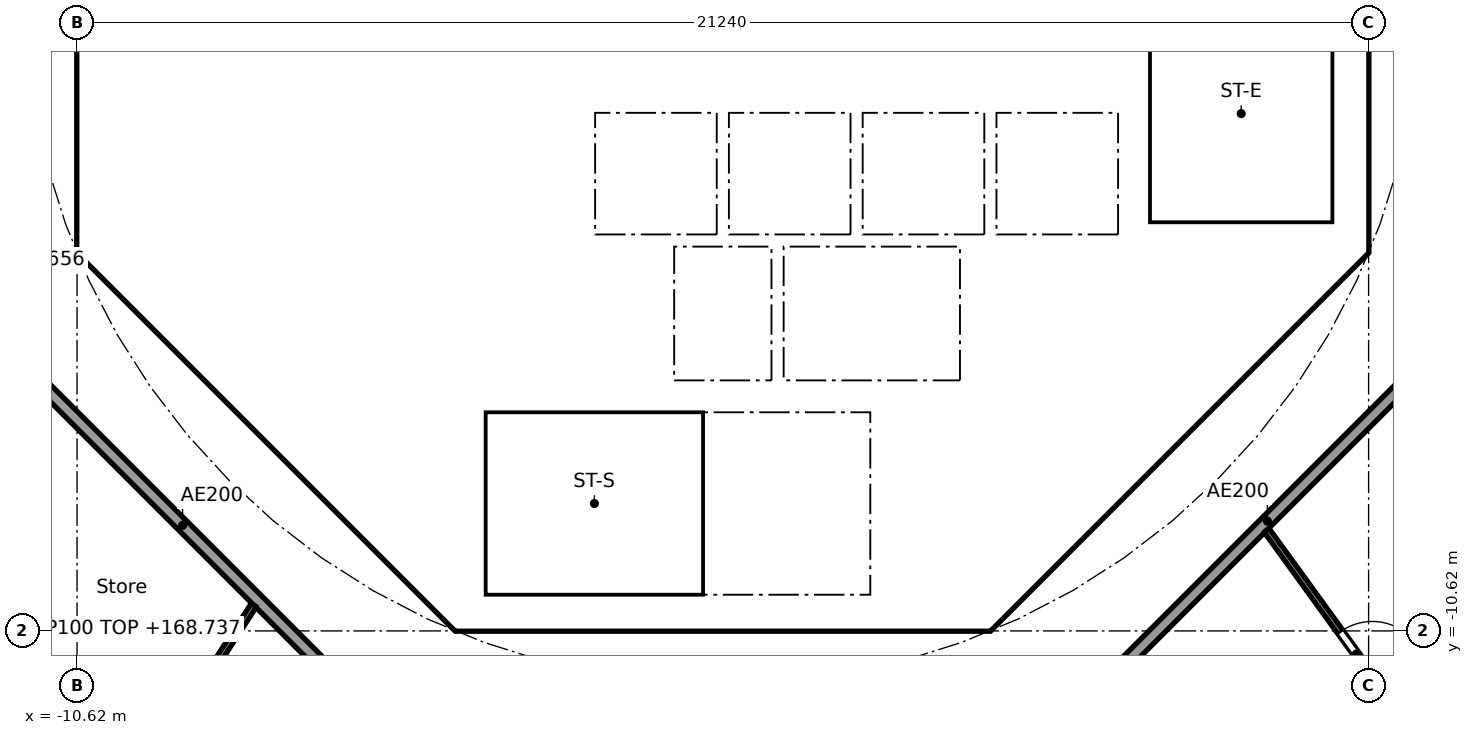
"""IFC4 building model, lengths in metres.
Left out: names, types, materials, properties, quantities, classifications, styles, units other than length and angle.
Written with IfcOpenShell. Run it as: python <this file> out.ifc"""

import sys

from ifc_helpers import new_model, si_unit, direction, frame, frame_2d, origin, place, context, subcontext, project, spatial, polyline, rectangle, outline, extrude, element, fill, save


model = new_model("IFC4")
c1 = context("Model", 3, precision=1e-05, world=origin(), true_north=direction((0.0, 1.0)))
c2 = subcontext(c1, "Body", "Model", "MODEL_VIEW")
j1 = project(units=[si_unit("LENGTHUNIT", "METRE"), si_unit("PLANEANGLEUNIT", "RADIAN")], contexts=[c1])
p1 = place(None, origin())
s1 = spatial("IfcSite", under=j1, at=p1, CompositionType="ELEMENT")
p2 = place(p1, origin())
s2 = spatial("IfcBuilding", under=s1, at=p2, CompositionType="ELEMENT")
p3 = place(p2, frame((0.0, 0.0, 165.9)))
s3 = spatial("IfcBuildingStorey", under=s2, at=p3, CompositionType="ELEMENT", Elevation=165.9)
p4 = place(p3, frame((-10.325, 3.801, 0.0), z_axis=(0.0, 0.0, 1.0), x_axis=(0.0, -1.0, 0.0)))
e1 = element("IfcWall", 1, at=p4, inside=s3, PredefinedType="SHEAR", context=c2, shape_type="SweptSolid", body=[
    extrude(rectangle(XDim=7.602, YDim=0.6, at=frame_2d((3.801, 0.0))), origin(), (0.0, 0.0, 1.0), 3.44),
])
p5 = place(p4, frame((0.651, 0.0, 0.0)))
e2 = element("IfcOpeningElement", 2, at=p5, cuts=e1, PredefinedType="OPENING", context=c2, shape_type="SweptSolid", body=[
    extrude(rectangle(XDim=1.5, YDim=2.1, at=frame_2d((0.75, 1.05))), frame((0.0, 0.31, 0.0), z_axis=(0.0, -1.0, 0.0), x_axis=(1.0, 0.0, 0.0)), (0.0, 0.0, 1.0), 0.62),
])
p6 = place(p4, frame((5.451, 0.0, 0.0)))
e3 = element("IfcOpeningElement", 3, at=p6, cuts=e1, PredefinedType="OPENING", context=c2, shape_type="SweptSolid", body=[
    extrude(rectangle(XDim=1.5, YDim=2.1, at=frame_2d((0.75, 1.05))), frame((0.0, 0.31, 0.0), z_axis=(0.0, -1.0, 0.0), x_axis=(1.0, 0.0, 0.0)), (0.0, 0.0, 1.0), 0.62),
])
p7 = place(p3, frame((-9.988, -4.613, 0.0), z_axis=(0.0, 0.0, 1.0), x_axis=(0.707106781187, -0.707106781187, 0.0)))
e4 = element("IfcWall", 4, at=p7, inside=s3, PredefinedType="SHEAR", context=c2, shape_type="SweptSolid", body=[
    extrude(rectangle(XDim=7.602, YDim=0.6, at=frame_2d((3.801, 0.0))), origin(), (0.0, 0.0, 1.0), 3.44),
])
p8 = place(p7, frame((6.151, 0.0, 0.0)))
e5 = element("IfcOpeningElement", 5, at=p8, cuts=e4, PredefinedType="OPENING", context=c2, shape_type="SweptSolid", body=[
    extrude(rectangle(XDim=1.1, YDim=2.1, at=frame_2d((0.55, 1.05))), frame((0.0, 0.31, 0.0), z_axis=(0.0, -1.0, 0.0), x_axis=(1.0, 0.0, 0.0)), (0.0, 0.0, 1.0), 0.62),
])
p9 = place(p3, frame((4.613, -9.988, 0.0), z_axis=(0.0, 0.0, 1.0), x_axis=(0.707106781187, 0.707106781187, 0.0)))
e6 = element("IfcWall", 6, at=p9, inside=s3, PredefinedType="SHEAR", context=c2, shape_type="SweptSolid", body=[
    extrude(rectangle(XDim=7.602, YDim=0.6, at=frame_2d((3.801, 0.0))), origin(), (0.0, 0.0, 1.0), 3.44),
])
p10 = place(p9, frame((3.201, 0.0, 0.0)))
e7 = element("IfcOpeningElement", 7, at=p10, cuts=e6, PredefinedType="OPENING", context=c2, shape_type="SweptSolid", body=[
    extrude(rectangle(XDim=1.2, YDim=2.1, at=frame_2d((0.6, 1.05))), frame((0.0, 0.31, 0.0), z_axis=(0.0, -1.0, 0.0), x_axis=(1.0, 0.0, 0.0)), (0.0, 0.0, 1.0), 0.62),
])
p11 = place(p3, frame((4.0, -10.025, 0.0), z_axis=(0.0, 0.0, 1.0), x_axis=(0.0, 1.0, 0.0)))
e8 = element("IfcWall", 8, at=p11, inside=s3, PredefinedType="SOLIDWALL", context=c2, shape_type="SweptSolid", body=[
    extrude(rectangle(XDim=3.0, YDim=0.2, at=frame_2d((1.5, 0.0))), origin(), (0.0, 0.0, 1.0), 3.44),
])
p12 = place(p11, frame((0.975, 0.0, 0.0)))
e9 = element("IfcOpeningElement", 9, at=p12, cuts=e8, PredefinedType="OPENING", context=c2, shape_type="SweptSolid", body=[
    extrude(rectangle(XDim=1.1, YDim=2.1, at=frame_2d((0.55, 1.05))), frame((0.0, 0.11, 0.0), z_axis=(0.0, -1.0, 0.0), x_axis=(1.0, 0.0, 0.0)), (0.0, 0.0, 1.0), 0.22),
])
p13 = place(p3, frame((-5.8, -8.227, 0.0), z_axis=(0.0, 0.0, 1.0), x_axis=(0.0, 1.0, 0.0)))
e10 = element("IfcWall", 10, at=p13, inside=s3, PredefinedType="PARTITIONING", context=c2, shape_type="SweptSolid", body=[
    extrude(rectangle(XDim=3.927, YDim=0.15, at=frame_2d((1.963, 0.0))), origin(), (0.0, 0.0, 1.0), 3.44),
])
p14 = place(p13, frame((2.764, 0.0, 0.0)))
e11 = element("IfcOpeningElement", 11, at=p14, cuts=e10, PredefinedType="OPENING", context=c2, shape_type="SweptSolid", body=[
    extrude(rectangle(XDim=0.9, YDim=2.1, at=frame_2d((0.45, 1.05))), frame((0.0, 0.085, 0.0), z_axis=(0.0, -1.0, 0.0), x_axis=(1.0, 0.0, 0.0)), (0.0, 0.0, 1.0), 0.17),
])
p15 = place(p13, frame((0.688, 0.0, 0.0)))
e12 = element("IfcOpeningElement", 12, at=p15, cuts=e10, PredefinedType="OPENING", context=c2, shape_type="SweptSolid", body=[
    extrude(rectangle(XDim=0.9, YDim=2.1, at=frame_2d((0.45, 1.05))), frame((0.0, 0.085, 0.0), z_axis=(0.0, -1.0, 0.0), x_axis=(1.0, 0.0, 0.0)), (0.0, 0.0, 1.0), 0.17),
])
p16 = place(p3, frame((4.0, -6.5, 0.0), z_axis=(0.0, 0.0, 1.0), x_axis=(0.0, 1.0, 0.0)))
e13 = element("IfcWall", 13, at=p16, inside=s3, PredefinedType="SOLIDWALL", context=c2, shape_type="SweptSolid", body=[
    extrude(rectangle(XDim=2.2, YDim=0.2, at=frame_2d((1.1, 0.0))), origin(), (0.0, 0.0, 1.0), 3.44),
])
p17 = place(p16, frame((0.55, 0.0, 0.0)))
e14 = element("IfcOpeningElement", 14, at=p17, cuts=e13, PredefinedType="OPENING", context=c2, shape_type="SweptSolid", body=[
    extrude(rectangle(XDim=1.1, YDim=2.1, at=frame_2d((0.55, 1.05))), frame((0.0, 0.11, 0.0), z_axis=(0.0, -1.0, 0.0), x_axis=(1.0, 0.0, 0.0)), (0.0, 0.0, 1.0), 0.22),
])
p18 = place(p3, frame((-4.0, -6.5, 0.0), z_axis=(0.0, 0.0, 1.0), x_axis=(0.0, 1.0, 0.0)))
e15 = element("IfcWall", 15, at=p18, inside=s3, PredefinedType="SOLIDWALL", context=c2, shape_type="SweptSolid", body=[
    extrude(rectangle(XDim=2.2, YDim=0.2, at=frame_2d((1.1, 0.0))), origin(), (0.0, 0.0, 1.0), 3.44),
])
p19 = place(p18, frame((0.65, 0.0, 0.0)))
e16 = element("IfcOpeningElement", 16, at=p19, cuts=e15, PredefinedType="OPENING", context=c2, shape_type="SweptSolid", body=[
    extrude(rectangle(XDim=0.9, YDim=2.1, at=frame_2d((0.45, 1.05))), frame((0.0, 0.11, 0.0), z_axis=(0.0, -1.0, 0.0), x_axis=(1.0, 0.0, 0.0)), (0.0, 0.0, 1.0), 0.22),
])
p20 = place(p3, frame((-6.7, -2.0, 0.0), z_axis=(0.0, 0.0, 1.0), x_axis=(1.0, 0.0, 0.0)))
e17 = element("IfcWall", 17, at=p20, inside=s3, PredefinedType="SOLIDWALL", context=c2, shape_type="SweptSolid", body=[
    extrude(rectangle(XDim=13.4, YDim=0.2, at=frame_2d((6.7, 0.0))), origin(), (0.0, 0.0, 1.0), 3.44),
])
p21 = place(p20, frame((5.05, 0.0, 0.0)))
e18 = element("IfcOpeningElement", 18, at=p21, cuts=e17, PredefinedType="OPENING", context=c2, shape_type="SweptSolid", body=[
    extrude(rectangle(XDim=1.1, YDim=2.1, at=frame_2d((0.55, 1.05))), frame((0.0, 0.11, 0.0), z_axis=(0.0, -1.0, 0.0), x_axis=(1.0, 0.0, 0.0)), (0.0, 0.0, 1.0), 0.22),
])
p22 = place(p20, frame((7.25, 0.0, 0.0)))
e19 = element("IfcOpeningElement", 19, at=p22, cuts=e17, PredefinedType="OPENING", context=c2, shape_type="SweptSolid", body=[
    extrude(rectangle(XDim=1.1, YDim=2.1, at=frame_2d((0.55, 1.05))), frame((0.0, 0.11, 0.0), z_axis=(0.0, -1.0, 0.0), x_axis=(1.0, 0.0, 0.0)), (0.0, 0.0, 1.0), 0.22),
])
p23 = place(p20, frame((1.85, 0.0, 0.0)))
e20 = element("IfcOpeningElement", 20, at=p23, cuts=e17, PredefinedType="OPENING", context=c2, shape_type="SweptSolid", body=[
    extrude(rectangle(XDim=0.9, YDim=2.1, at=frame_2d((0.45, 1.05))), frame((0.0, 0.11, 0.0), z_axis=(0.0, -1.0, 0.0), x_axis=(1.0, 0.0, 0.0)), (0.0, 0.0, 1.0), 0.22),
])
p24 = place(p3, origin())
e21 = element("IfcWall", 21, at=p24, inside=s3, PredefinedType="SHEAR", context=c2, shape_type="SweptSolid", body=[
    extrude(outline(polyline([(-10.625, -3.801), (-10.025, -3.801), (-10.025, -4.152), (-9.776, -4.401), (-10.2, -4.825), (-10.625, -4.401), (-10.625, -3.801)])), origin(), (0.0, 0.0, 1.0), 3.44),
])
p25 = place(p3, origin())
e22 = element("IfcWall", 22, at=p25, inside=s3, PredefinedType="SHEAR", context=c2, shape_type="SweptSolid", body=[
    extrude(outline(polyline([(-4.152, -10.025), (4.152, -10.025), (4.401, -9.776), (4.825, -10.2), (4.401, -10.625), (-4.401, -10.625), (-4.825, -10.2), (-4.401, -9.776), (-4.152, -10.025)])), origin(), (0.0, 0.0, 1.0), 3.44),
])
p26 = place(p3, origin())
e23 = element("IfcWall", 23, at=p26, inside=s3, PredefinedType="SHEAR", context=c2, shape_type="SweptSolid", body=[
    extrude(outline(polyline([(9.776, -4.401), (10.025, -4.152), (10.025, -3.801), (10.025, 4.152), (9.776, 4.401), (10.2, 4.825), (10.625, 4.401), (10.625, -4.401), (10.2, -4.825), (9.776, -4.401)])), origin(), (0.0, 0.0, 1.0), 3.44),
])
for number, where, z_axis, x_axis in (
    (24, (-0.9, -6.5, 0.0), (0.0, 0.0, 1.0), (0.0, 1.0, 0.0)),
    (25, (0.9, -6.5, 0.0), (0.0, 0.0, 1.0), (0.0, 1.0, 0.0)),
):
    element("IfcWall", number, at=place(p3, frame(where, z_axis=z_axis, x_axis=x_axis)), inside=s3, PredefinedType="SOLIDWALL", context=c2, shape_type="SweptSolid", body=[
        extrude(rectangle(XDim=2.2, YDim=0.2, at=frame_2d((1.1, 0.0))), origin(), (0.0, 0.0, 1.0), 3.44),
    ])
p27 = place(p3, origin())
e26 = element("IfcWall", 26, at=p27, inside=s3, PredefinedType="SOLIDWALL", context=c2, shape_type="SweptSolid", body=[
    extrude(outline(polyline([(-6.7, -2.1), (-6.5, -2.1), (-6.5, -4.1), (-2.3, -4.1), (-2.3, -2.1), (-2.1, -2.1), (-2.1, -4.1), (-0.1, -4.1), (-0.1, -2.1), (0.1, -2.1), (0.1, -4.1), (2.1, -4.1), (2.1, -2.1), (2.3, -2.1), (2.3, -4.1), (4.3, -4.1), (4.3, -2.1), (4.5, -2.1), (4.5, -4.1), (6.5, -4.1), (6.5, -2.1), (6.7, -2.1), (6.7, -4.3), (-6.7, -4.3), (-6.7, -2.1)])), origin(), (0.0, 0.0, 1.0), 3.44),
])
p28 = place(p3, frame((-10.025, -4.0, 0.0), z_axis=(0.0, 0.0, 1.0), x_axis=(1.0, 0.0, 0.0)))
e27 = element("IfcWall", 27, at=p28, inside=s3, PredefinedType="PARTITIONING", context=c2, shape_type="SweptSolid", body=[
    extrude(rectangle(XDim=3.325, YDim=0.2, at=frame_2d((1.662, 0.0))), origin(), (0.0, 0.0, 1.0), 3.44),
])
p29 = place(p3, frame((-8.301, -5.8, 0.0), z_axis=(0.0, 0.0, 1.0), x_axis=(1.0, 0.0, 0.0)))
e28 = element("IfcWall", 28, at=p29, inside=s3, PredefinedType="PARTITIONING", context=c2, shape_type="SweptSolid", body=[
    extrude(rectangle(XDim=2.426, YDim=0.15, at=frame_2d((1.213, 0.0))), origin(), (0.0, 0.0, 1.0), 3.44),
])
p30 = place(p3, origin())
e29 = element("IfcWall", 29, at=p30, inside=s3, PredefinedType="SOLIDWALL", context=c2, shape_type="SweptSolid", body=[
    extrude(outline(polyline([(-3.9, -10.025), (-4.1, -10.025), (-4.1, -7.025), (-3.9, -7.025), (-3.9, -10.025)])), origin(), (0.0, 0.0, 1.0), 3.44),
])
p31 = place(p3, origin())
e30 = element("IfcWall", 30, at=p31, inside=s3, PredefinedType="SOLIDWALL", context=c2, shape_type="SweptSolid", body=[
    extrude(outline(polyline([(4.1, -7.025), (-4.1, -7.025), (-4.1, -6.5), (4.1, -6.5), (4.1, -7.025)])), origin(), (0.0, 0.0, 1.0), 3.44),
])
p32 = place(p3, origin())
e31 = element("IfcWall", 31, at=p32, inside=s3, PredefinedType="SOLIDWALL", context=c2, shape_type="SweptSolid", body=[
    extrude(outline(polyline([(7.025, -3.9), (6.7, -3.9), (6.7, 3.9), (7.025, 3.9), (7.025, -3.9)])), origin(), (0.0, 0.0, 1.0), 3.44),
])
p33 = place(p3, origin())
e32 = element("IfcWall", 32, at=p33, inside=s3, PredefinedType="SOLIDWALL", context=c2, shape_type="SweptSolid", body=[
    extrude(outline(polyline([(10.025, -4.1), (6.7, -4.1), (6.7, -3.9), (10.025, -3.9), (10.025, -4.1)])), origin(), (0.0, 0.0, 1.0), 3.44),
])
p34 = place(p3, frame((-12.635, -5.134, 0.0), z_axis=(0.0, 0.0, 1.0), x_axis=(0.707106781187, -0.707106781187, 0.0)))
e33 = element("IfcWall", 33, at=p34, inside=s3, PredefinedType="PARTITIONING", context=c2, shape_type="SweptSolid", body=[
    extrude(rectangle(XDim=10.609, YDim=0.2, at=frame_2d((5.305, 0.0))), origin(), (0.0, 0.0, 1.0), 3.44),
])
p35 = place(p3, frame((5.275, -12.494, 0.0), z_axis=(0.0, 0.0, 1.0), x_axis=(0.707106781187, 0.707106781187, 0.0)))
e34 = element("IfcWall", 34, at=p35, inside=s3, PredefinedType="PARTITIONING", context=c2, shape_type="SweptSolid", body=[
    extrude(rectangle(XDim=10.409, YDim=0.2, at=frame_2d((5.205, 0.0))), origin(), (0.0, 0.0, 1.0), 3.44),
])
p36 = place(p3, frame((-12.623, -9.653, 0.0), z_axis=(0.0, 0.0, 1.0), x_axis=(0.640297481347, -0.768127030758, 0.0)))
e35 = element("IfcWall", 35, at=p36, inside=s3, PredefinedType="PARTITIONING", context=c2, shape_type="SweptSolid", body=[
    extrude(rectangle(XDim=4.672, YDim=0.1, at=frame_2d((2.336, 0.0))), origin(), (0.0, 0.0, 1.0), 2.837),
])
p37 = place(p36, frame((3.029, 0.0, 0.0)))
e36 = element("IfcOpeningElement", 36, at=p37, cuts=e35, PredefinedType="OPENING", context=c2, shape_type="SweptSolid", body=[
    extrude(rectangle(XDim=0.9, YDim=2.1, at=frame_2d((0.45, 1.05))), frame((0.0, 0.06, 0.0), z_axis=(0.0, -1.0, 0.0), x_axis=(1.0, 0.0, 0.0)), (0.0, 0.0, 1.0), 0.12),
])
p38 = place(p3, frame((-7.712, -10.195, 0.0), z_axis=(0.0, 0.0, 1.0), x_axis=(-0.544170086001, -0.838974920663, 0.0)))
e37 = element("IfcWall", 37, at=p38, inside=s3, PredefinedType="PARTITIONING", context=c2, shape_type="SweptSolid", body=[
    extrude(rectangle(XDim=3.535, YDim=0.1, at=frame_2d((1.768, 0.0))), origin(), (0.0, 0.0, 1.0), 2.756),
])
p39 = place(p3, frame((8.943, -8.966, 0.0), z_axis=(0.0, 0.0, 1.0), x_axis=(0.586803608919, -0.809729290912, 0.0)))
e38 = element("IfcWall", 38, at=p39, inside=s3, PredefinedType="PARTITIONING", context=c2, shape_type="SweptSolid", body=[
    extrude(rectangle(XDim=17.179, YDim=0.1, at=frame_2d((8.589, 0.0))), origin(), (0.0, 0.0, 1.0), 2.756),
])
p40 = place(p39, frame((2.062, 0.0, 0.0)))
e39 = element("IfcOpeningElement", 39, at=p40, cuts=e38, PredefinedType="OPENING", context=c2, shape_type="SweptSolid", body=[
    extrude(rectangle(XDim=0.9, YDim=2.1, at=frame_2d((0.45, 1.05))), frame((0.0, 0.06, 0.0), z_axis=(0.0, -1.0, 0.0), x_axis=(1.0, 0.0, 0.0)), (0.0, 0.0, 1.0), 0.12),
])
p41 = place(p39, frame((7.308, 0.0, 0.0)))
e40 = element("IfcOpeningElement", 40, at=p41, cuts=e38, PredefinedType="OPENING", context=c2, shape_type="SweptSolid", body=[
    extrude(rectangle(XDim=0.9, YDim=2.1, at=frame_2d((0.45, 1.05))), frame((0.0, 0.06, 0.0), z_axis=(0.0, -1.0, 0.0), x_axis=(1.0, 0.0, 0.0)), (0.0, 0.0, 1.0), 0.12),
])
p42 = place(p21, origin())
e41 = element("IfcDoor", 41, at=p42, inside=s3, OperationType="DOUBLE_DOOR_SLIDING", PredefinedType="DOOR", context=c2, shape_type="SweptSolid", body=[
    extrude(rectangle(XDim=1.1, YDim=2.1, at=frame_2d((0.55, 1.05))), frame((0.0, 0.025, 0.0), z_axis=(0.0, -1.0, 0.0), x_axis=(1.0, 0.0, 0.0)), (0.0, 0.0, 1.0), 0.05),
])
fill(e18, e41)
p43 = place(p22, origin())
e42 = element("IfcDoor", 42, at=p43, inside=s3, OperationType="DOUBLE_DOOR_SLIDING", PredefinedType="DOOR", context=c2, shape_type="SweptSolid", body=[
    extrude(rectangle(XDim=1.1, YDim=2.1, at=frame_2d((0.55, 1.05))), frame((0.0, 0.025, 0.0), z_axis=(0.0, -1.0, 0.0), x_axis=(1.0, 0.0, 0.0)), (0.0, 0.0, 1.0), 0.05),
])
fill(e19, e42)
p44 = place(p17, origin())
e43 = element("IfcDoor", 43, at=p44, inside=s3, OperationType="DOUBLE_DOOR_SLIDING", PredefinedType="DOOR", context=c2, shape_type="SweptSolid", body=[
    extrude(rectangle(XDim=1.1, YDim=2.1, at=frame_2d((0.55, 1.05))), frame((0.0, 0.025, 0.0), z_axis=(0.0, -1.0, 0.0), x_axis=(1.0, 0.0, 0.0)), (0.0, 0.0, 1.0), 0.05),
])
fill(e14, e43)
p45 = place(p12, origin())
e44 = element("IfcDoor", 44, at=p45, inside=s3, OperationType="SINGLE_SWING_RIGHT", PredefinedType="DOOR", context=c2, shape_type="SweptSolid", body=[
    extrude(rectangle(XDim=1.1, YDim=2.1, at=frame_2d((0.55, 1.05))), frame((0.0, 0.025, 0.0), z_axis=(0.0, -1.0, 0.0), x_axis=(1.0, 0.0, 0.0)), (0.0, 0.0, 1.0), 0.05),
])
fill(e9, e44)
p46 = place(p14, origin())
e45 = element("IfcDoor", 45, at=p46, inside=s3, OperationType="SINGLE_SWING_RIGHT", PredefinedType="DOOR", context=c2, shape_type="SweptSolid", body=[
    extrude(rectangle(XDim=0.9, YDim=2.1, at=frame_2d((0.45, 1.05))), frame((0.0, 0.025, 0.0), z_axis=(0.0, -1.0, 0.0), x_axis=(1.0, 0.0, 0.0)), (0.0, 0.0, 1.0), 0.05),
])
fill(e11, e45)
p47 = place(p15, origin())
e46 = element("IfcDoor", 46, at=p47, inside=s3, OperationType="SINGLE_SWING_RIGHT", PredefinedType="DOOR", context=c2, shape_type="SweptSolid", body=[
    extrude(rectangle(XDim=0.9, YDim=2.1, at=frame_2d((0.45, 1.05))), frame((0.0, 0.025, 0.0), z_axis=(0.0, -1.0, 0.0), x_axis=(1.0, 0.0, 0.0)), (0.0, 0.0, 1.0), 0.05),
])
fill(e12, e46)
p48 = place(p19, frame((0.9, 0.0, 0.0), x_axis=(-1.0, 0.0, 0.0)))
e47 = element("IfcDoor", 47, at=p48, inside=s3, OperationType="SINGLE_SWING_LEFT", PredefinedType="DOOR", context=c2, shape_type="SweptSolid", body=[
    extrude(rectangle(XDim=0.9, YDim=2.1, at=frame_2d((0.45, 1.05))), frame((0.0, 0.025, 0.0), z_axis=(0.0, -1.0, 0.0), x_axis=(1.0, 0.0, 0.0)), (0.0, 0.0, 1.0), 0.05),
])
fill(e16, e47)
p49 = place(p23, frame((0.9, 0.0, 0.0), x_axis=(-1.0, 0.0, 0.0)))
e48 = element("IfcDoor", 48, at=p49, inside=s3, OperationType="SINGLE_SWING_RIGHT", PredefinedType="DOOR", context=c2, shape_type="SweptSolid", body=[
    extrude(rectangle(XDim=0.9, YDim=2.1, at=frame_2d((0.45, 1.05))), frame((0.0, 0.025, 0.0), z_axis=(0.0, -1.0, 0.0), x_axis=(1.0, 0.0, 0.0)), (0.0, 0.0, 1.0), 0.05),
])
fill(e20, e48)
p50 = place(p10, origin())
e49 = element("IfcDoor", 49, at=p50, inside=s3, OperationType="SINGLE_SWING_LEFT", PredefinedType="DOOR", context=c2, shape_type="SweptSolid", body=[
    extrude(rectangle(XDim=1.2, YDim=2.1, at=frame_2d((0.6, 1.05))), frame((0.0, 0.025, 0.0), z_axis=(0.0, -1.0, 0.0), x_axis=(1.0, 0.0, 0.0)), (0.0, 0.0, 1.0), 0.05),
])
fill(e7, e49)
p51 = place(p6, origin())
e50 = element("IfcDoor", 50, at=p51, inside=s3, OperationType="DOUBLE_DOOR_SINGLE_SWING", PredefinedType="DOOR", context=c2, shape_type="SweptSolid", body=[
    extrude(rectangle(XDim=1.5, YDim=2.1, at=frame_2d((0.75, 1.05))), frame((0.0, 0.025, 0.0), z_axis=(0.0, -1.0, 0.0), x_axis=(1.0, 0.0, 0.0)), (0.0, 0.0, 1.0), 0.05),
])
fill(e3, e50)
p52 = place(p8, origin())
e51 = element("IfcDoor", 51, at=p52, inside=s3, OperationType="SINGLE_SWING_LEFT", PredefinedType="DOOR", context=c2, shape_type="SweptSolid", body=[
    extrude(rectangle(XDim=1.1, YDim=2.1, at=frame_2d((0.55, 1.05))), frame((0.0, 0.025, 0.0), z_axis=(0.0, -1.0, 0.0), x_axis=(1.0, 0.0, 0.0)), (0.0, 0.0, 1.0), 0.05),
])
fill(e5, e51)
p53 = place(p40, origin())
e52 = element("IfcDoor", 52, at=p53, inside=s3, OperationType="SINGLE_SWING_RIGHT", PredefinedType="DOOR", context=c2, shape_type="SweptSolid", body=[
    extrude(rectangle(XDim=0.9, YDim=2.1, at=frame_2d((0.45, 1.05))), frame((0.0, 0.025, 0.0), z_axis=(0.0, -1.0, 0.0), x_axis=(1.0, 0.0, 0.0)), (0.0, 0.0, 1.0), 0.05),
])
fill(e39, e52)
save(model, sys.argv[1])
